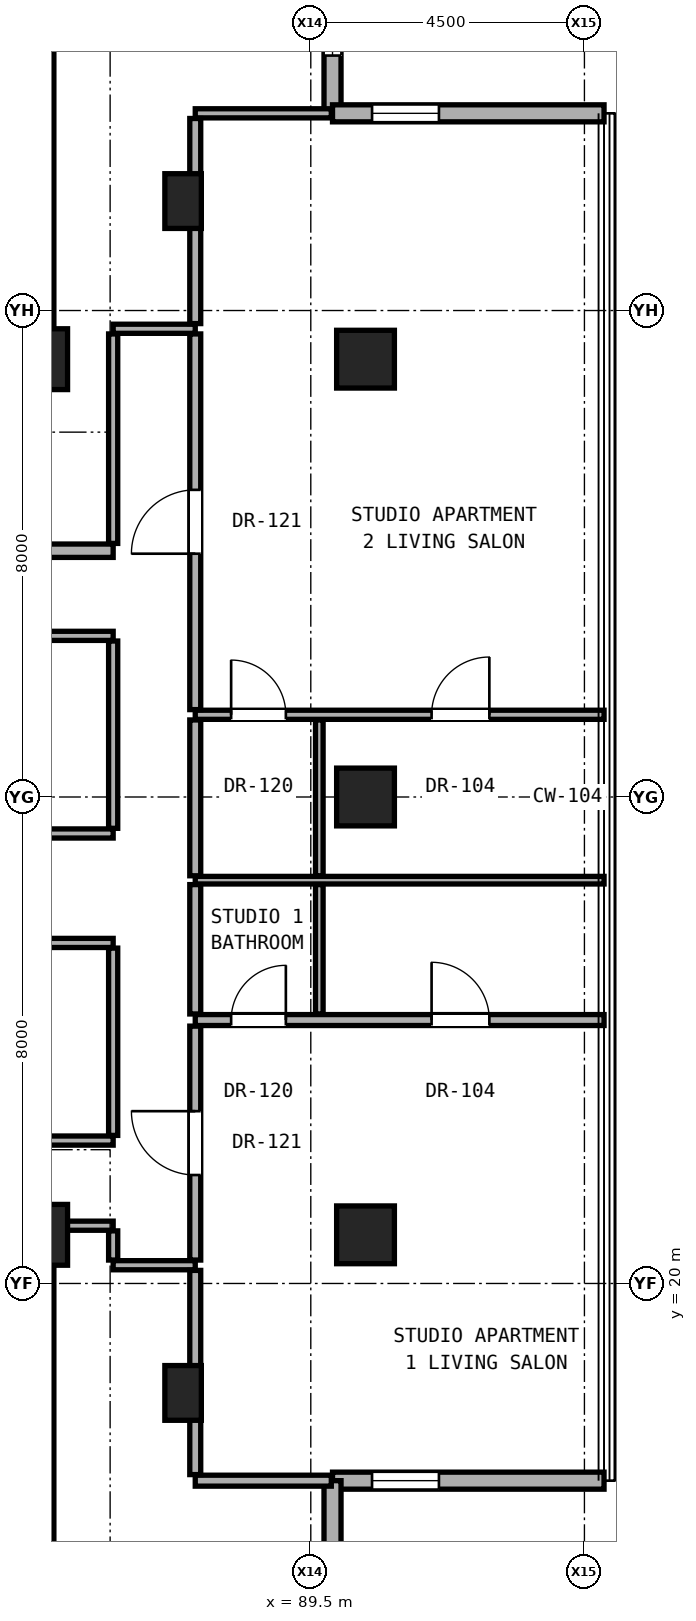
"""IFC4 building model, lengths in metres.
Left out: names, types, materials, properties, quantities, classifications, styles, units other than length and angle.
Written with IfcOpenShell. Run it as: python <this file> out.ifc"""

import sys

from ifc_helpers import new_model, si_unit, direction, frame, frame_2d, origin, origin_2d, place, context, subcontext, project, spatial, rectangle, hollow_rectangle, extrude, element, fill, save


model = new_model("IFC4")
c1 = context("Model", 3, precision=1e-05, world=origin(), true_north=direction((0.0, 1.0)))
c2 = subcontext(c1, "Body", "Model", "MODEL_VIEW")
j1 = project(units=[si_unit("LENGTHUNIT", "METRE"), si_unit("PLANEANGLEUNIT", "RADIAN")], contexts=[c1])
p1 = place(None, origin())
s1 = spatial("IfcSite", under=j1, at=p1, CompositionType="ELEMENT")
p2 = place(p1, origin())
s2 = spatial("IfcBuilding", under=s1, at=p2, CompositionType="ELEMENT")
p3 = place(p2, frame((0.0, 0.0, 170.65)))
s3 = spatial("IfcBuildingStorey", under=s2, at=p3, CompositionType="ELEMENT", Elevation=170.65)
for number, where, z_axis, x_axis in (
    (1, (85.0, 20.8, 0.0), (0.0, 0.0, 1.0), (1.0, 0.0, 0.0)),
    (2, (85.0, 35.2, 0.0), (0.0, 0.0, 1.0), (1.0, 0.0, 0.0)),
):
    element("IfcColumn", number, at=place(p3, frame(where, z_axis=z_axis, x_axis=x_axis)), inside=s3, PredefinedType="COLUMN", context=c2, shape_type="SweptSolid", body=[
        extrude(rectangle(XDim=1.0, YDim=1.0, at=origin_2d()), origin(), (0.0, 0.0, 1.0), 3.25),
    ])
for number, where, z_axis, x_axis in (
    (3, (90.4, 20.8, 0.0), (0.0, 0.0, 1.0), (1.0, 0.0, 0.0)),
    (4, (90.4, 28.0, 0.0), (0.0, 0.0, 1.0), (1.0, 0.0, 0.0)),
    (5, (90.4, 35.2, 0.0), (0.0, 0.0, 1.0), (1.0, 0.0, 0.0)),
):
    element("IfcColumn", number, at=place(p3, frame(where, z_axis=z_axis, x_axis=x_axis)), inside=s3, PredefinedType="COLUMN", context=c2, shape_type="SweptSolid", body=[
        extrude(hollow_rectangle(XDim=0.95, YDim=0.95, WallThickness=0.05, at=origin_2d()), origin(), (0.0, 0.0, 1.0), 3.25),
    ])
for number, where, z_axis, x_axis in (
    (6, (87.4, 18.2, 0.0), (0.0, 0.0, 1.0), (1.0, 0.0, 0.0)),
    (7, (87.4, 37.8, 0.0), (0.0, 0.0, 1.0), (1.0, 0.0, 0.0)),
):
    element("IfcColumn", number, at=place(p3, frame(where, z_axis=z_axis, x_axis=x_axis)), inside=s3, PredefinedType="PILASTER", context=c2, shape_type="SweptSolid", body=[
        extrude(rectangle(XDim=0.6, YDim=0.9, at=origin_2d()), origin(), (0.0, 0.0, 1.0), 3.25),
    ])
for number, where, z_axis, x_axis in (
    (8, (85.0, 35.2, 0.0), (0.0, 0.0, 1.0), (0.0, 1.0, 0.0)),
    (9, (85.0, 15.2, 0.0), (0.0, 0.0, 1.0), (0.0, 1.0, 0.0)),
):
    element("IfcWall", number, at=place(p3, frame(where, z_axis=z_axis, x_axis=x_axis)), inside=s3, PredefinedType="SHEAR", context=c2, shape_type="SweptSolid", body=[
        extrude(rectangle(XDim=5.6, YDim=0.55, at=frame_2d((2.8, 0.0))), origin(), (0.0, 0.0, 1.0), 3.05),
    ])
p4 = place(p3, frame((89.857, 39.243, 0.0), z_axis=(0.0, 0.0, 1.0), x_axis=(0.0, 1.0, 0.0)))
e10 = element("IfcWall", 10, at=p4, inside=s3, PredefinedType="SOLIDWALL", context=c2, shape_type="SweptSolid", body=[
    extrude(rectangle(XDim=4.465, YDim=0.28, at=frame_2d((2.232, 0.0))), origin(), (0.0, 0.0, 1.0), 3.03),
])
p5 = place(p4, frame((0.95, 0.0, 0.85)))
e11 = element("IfcOpeningElement", 11, at=p5, cuts=e10, PredefinedType="OPENING", context=c2, shape_type="SweptSolid", body=[
    extrude(rectangle(XDim=1.1, YDim=2.0, at=frame_2d((0.55, 1.0))), frame((0.0, 0.15, 0.0), z_axis=(0.0, -1.0, 0.0), x_axis=(1.0, 0.0, 0.0)), (0.0, 0.0, 1.0), 0.3),
])
p6 = place(p3, frame((89.857, 16.757, 0.0), z_axis=(0.0, 0.0, 1.0), x_axis=(1.0, 0.0, 0.0)))
e12 = element("IfcWall", 12, at=p6, inside=s3, PredefinedType="SOLIDWALL", context=c2, shape_type="SweptSolid", body=[
    extrude(rectangle(XDim=4.465, YDim=0.28, at=frame_2d((2.232, 0.0))), origin(), (0.0, 0.0, 1.0), 3.03),
])
p7 = place(p6, frame((0.65, 0.0, 0.85)))
e13 = element("IfcOpeningElement", 13, at=p7, cuts=e12, PredefinedType="OPENING", context=c2, shape_type="SweptSolid", body=[
    extrude(rectangle(XDim=1.1, YDim=2.0, at=frame_2d((0.55, 1.0))), frame((0.0, 0.15, 0.0), z_axis=(0.0, -1.0, 0.0), x_axis=(1.0, 0.0, 0.0)), (0.0, 0.0, 1.0), 0.3),
])
p8 = place(p3, frame((89.857, 12.292, 0.0), z_axis=(0.0, 0.0, 1.0), x_axis=(0.0, 1.0, 0.0)))
e14 = element("IfcWall", 14, at=p8, inside=s3, PredefinedType="SOLIDWALL", context=c2, shape_type="SweptSolid", body=[
    extrude(rectangle(XDim=4.465, YDim=0.28, at=frame_2d((2.232, 0.0))), origin(), (0.0, 0.0, 1.0), 3.03),
])
p9 = place(p3, frame((94.323, 39.243, 0.0), z_axis=(0.0, 0.0, 1.0), x_axis=(-1.0, 0.0, 0.0)))
e15 = element("IfcWall", 15, at=p9, inside=s3, PredefinedType="SOLIDWALL", context=c2, shape_type="SweptSolid", body=[
    extrude(rectangle(XDim=4.465, YDim=0.28, at=frame_2d((2.232, 0.0))), origin(), (0.0, 0.0, 1.0), 3.03),
])
p10 = place(p9, frame((2.715, 0.0, 0.85)))
e16 = element("IfcOpeningElement", 16, at=p10, cuts=e15, PredefinedType="OPENING", context=c2, shape_type="SweptSolid", body=[
    extrude(rectangle(XDim=1.1, YDim=2.0, at=frame_2d((0.55, 1.0))), frame((0.0, 0.15, 0.0), z_axis=(0.0, -1.0, 0.0), x_axis=(1.0, 0.0, 0.0)), (0.0, 0.0, 1.0), 0.3),
])
p11 = place(p3, frame((87.6, 16.757, 0.0), z_axis=(0.0, 0.0, 1.0), x_axis=(1.0, 0.0, 0.0)))
e17 = element("IfcWall", 17, at=p11, inside=s3, PredefinedType="PARTITIONING", context=c2, shape_type="SweptSolid", body=[
    extrude(rectangle(XDim=2.237, YDim=0.18, at=frame_2d((1.119, 0.0))), origin(), (0.0, 0.0, 1.0), 3.05),
])
p12 = place(p3, frame((86.25, 20.3, 0.0), z_axis=(0.0, 0.0, 1.0), x_axis=(1.0, 0.0, 0.0)))
e18 = element("IfcWall", 18, at=p12, inside=s3, PredefinedType="PARTITIONING", context=c2, shape_type="SweptSolid", body=[
    extrude(rectangle(XDim=1.35, YDim=0.15, at=frame_2d((0.675, 0.0))), origin(), (0.0, 0.0, 1.0), 3.05),
])
p13 = place(p3, frame((85.27, 20.95, 0.0), z_axis=(0.0, 0.0, 1.0), x_axis=(1.0, 0.0, 0.0)))
e19 = element("IfcWall", 19, at=p13, inside=s3, PredefinedType="PARTITIONING", context=c2, shape_type="SweptSolid", body=[
    extrude(rectangle(XDim=0.98, YDim=0.15, at=frame_2d((0.49, 0.0))), origin(), (0.0, 0.0, 1.0), 2.442),
])
p14 = place(p3, frame((78.64, 22.35, 0.0), z_axis=(0.0, 0.0, 1.0), x_axis=(1.0, 0.0, 0.0)))
e20 = element("IfcWall", 20, at=p14, inside=s3, PredefinedType="PARTITIONING", context=c2, shape_type="SweptSolid", body=[
    extrude(rectangle(XDim=7.61, YDim=0.15, at=frame_2d((3.805, 0.0))), origin(), (0.0, 0.0, 1.0), 2.186),
])
p15 = place(p14, frame((3.33, 0.0, 0.0)))
e21 = element("IfcOpeningElement", 21, at=p15, cuts=e20, PredefinedType="OPENING", context=c2, shape_type="SweptSolid", body=[
    extrude(rectangle(XDim=0.95, YDim=2.15, at=frame_2d((0.475, 1.075))), frame((0.0, 0.085, 0.0), z_axis=(0.0, -1.0, 0.0), x_axis=(1.0, 0.0, 0.0)), (0.0, 0.0, 1.0), 0.17),
])
p16 = place(p3, frame((87.6, 24.332, 0.0), z_axis=(0.0, 0.0, 1.0), x_axis=(1.0, 0.0, 0.0)))
e22 = element("IfcWall", 22, at=p16, inside=s3, PredefinedType="PARTITIONING", context=c2, shape_type="SweptSolid", body=[
    extrude(rectangle(XDim=6.723, YDim=0.18, at=frame_2d((3.361, 0.0))), origin(), (0.0, 0.0, 1.0), 2.269),
])
p17 = place(p16, frame((3.886, 0.0, 0.0)))
e23 = element("IfcOpeningElement", 23, at=p17, cuts=e22, PredefinedType="OPENING", context=c2, shape_type="SweptSolid", body=[
    extrude(rectangle(XDim=0.95, YDim=2.15, at=frame_2d((0.475, 1.075))), frame((0.0, 0.1, 0.0), z_axis=(0.0, -1.0, 0.0), x_axis=(1.0, 0.0, 0.0)), (0.0, 0.0, 1.0), 0.2),
])
p18 = place(p16, frame((0.59, 0.0, 0.0)))
e24 = element("IfcOpeningElement", 24, at=p18, cuts=e22, PredefinedType="OPENING", context=c2, shape_type="SweptSolid", body=[
    extrude(rectangle(XDim=0.9, YDim=2.1, at=frame_2d((0.45, 1.05))), frame((0.0, 0.1, 0.0), z_axis=(0.0, -1.0, 0.0), x_axis=(1.0, 0.0, 0.0)), (0.0, 0.0, 1.0), 0.2),
])
p19 = place(p3, frame((78.6, 25.6, 0.0), z_axis=(0.0, 0.0, 1.0), x_axis=(1.0, 0.0, 0.0)))
e25 = element("IfcWall", 25, at=p19, inside=s3, PredefinedType="PARTITIONING", context=c2, shape_type="SweptSolid", body=[
    extrude(rectangle(XDim=7.65, YDim=0.15, at=frame_2d((3.825, 0.0))), origin(), (0.0, 0.0, 1.0), 2.186),
])
p20 = place(p3, frame((87.6, 26.632, 0.0), z_axis=(0.0, 0.0, 1.0), x_axis=(1.0, 0.0, 0.0)))
e26 = element("IfcWall", 26, at=p20, inside=s3, PredefinedType="PARTITIONING", context=c2, shape_type="SweptSolid", body=[
    extrude(rectangle(XDim=6.723, YDim=0.125, at=frame_2d((3.361, 0.0))), origin(), (0.0, 0.0, 1.0), 2.269),
])
p21 = place(p3, frame((78.6, 27.4, 0.0), z_axis=(0.0, 0.0, 1.0), x_axis=(1.0, 0.0, 0.0)))
e27 = element("IfcWall", 27, at=p21, inside=s3, PredefinedType="PARTITIONING", context=c2, shape_type="SweptSolid", body=[
    extrude(rectangle(XDim=7.65, YDim=0.15, at=frame_2d((3.825, 0.0))), origin(), (0.0, 0.0, 1.0), 2.186),
])
p22 = place(p3, frame((87.6, 29.352, 0.0), z_axis=(0.0, 0.0, 1.0), x_axis=(1.0, 0.0, 0.0)))
e28 = element("IfcWall", 28, at=p22, inside=s3, PredefinedType="PARTITIONING", context=c2, shape_type="SweptSolid", body=[
    extrude(rectangle(XDim=6.723, YDim=0.15, at=frame_2d((3.361, 0.0))), origin(), (0.0, 0.0, 1.0), 2.269),
])
p23 = place(p22, frame((3.886, 0.0, 0.0)))
e29 = element("IfcOpeningElement", 29, at=p23, cuts=e28, PredefinedType="OPENING", context=c2, shape_type="SweptSolid", body=[
    extrude(rectangle(XDim=0.95, YDim=2.15, at=frame_2d((0.475, 1.075))), frame((0.0, 0.085, 0.0), z_axis=(0.0, -1.0, 0.0), x_axis=(1.0, 0.0, 0.0)), (0.0, 0.0, 1.0), 0.17),
])
p24 = place(p22, frame((0.59, 0.0, 0.0)))
e30 = element("IfcOpeningElement", 30, at=p24, cuts=e28, PredefinedType="OPENING", context=c2, shape_type="SweptSolid", body=[
    extrude(rectangle(XDim=0.9, YDim=2.1, at=frame_2d((0.45, 1.05))), frame((0.0, 0.085, 0.0), z_axis=(0.0, -1.0, 0.0), x_axis=(1.0, 0.0, 0.0)), (0.0, 0.0, 1.0), 0.17),
])
p25 = place(p3, frame((78.64, 30.65, 0.0), z_axis=(0.0, 0.0, 1.0), x_axis=(1.0, 0.0, 0.0)))
e31 = element("IfcWall", 31, at=p25, inside=s3, PredefinedType="PARTITIONING", context=c2, shape_type="SweptSolid", body=[
    extrude(rectangle(XDim=7.61, YDim=0.15, at=frame_2d((3.805, 0.0))), origin(), (0.0, 0.0, 1.0), 2.186),
])
p26 = place(p25, frame((3.33, 0.0, 0.0)))
e32 = element("IfcOpeningElement", 32, at=p26, cuts=e31, PredefinedType="OPENING", context=c2, shape_type="SweptSolid", body=[
    extrude(rectangle(XDim=0.95, YDim=2.15, at=frame_2d((0.475, 1.075))), frame((0.0, 0.085, 0.0), z_axis=(0.0, -1.0, 0.0), x_axis=(1.0, 0.0, 0.0)), (0.0, 0.0, 1.0), 0.17),
])
p27 = place(p3, frame((71.55, 32.05, 0.0), z_axis=(0.0, 0.0, 1.0), x_axis=(1.0, 0.0, 0.0)))
e33 = element("IfcWall", 33, at=p27, inside=s3, PredefinedType="SOLIDWALL", context=c2, shape_type="SweptSolid", body=[
    extrude(rectangle(XDim=14.7, YDim=0.22, at=frame_2d((7.35, 0.0))), origin(), (0.0, 0.0, 1.0), 2.186),
])
p28 = place(p27, frame((6.065, 0.0, 0.0)))
e34 = element("IfcOpeningElement", 34, at=p28, cuts=e33, PredefinedType="OPENING", context=c2, shape_type="SweptSolid", body=[
    extrude(rectangle(XDim=0.85, YDim=2.01, at=frame_2d((0.425, 1.005))), frame((0.0, 0.12, 0.0), z_axis=(0.0, -1.0, 0.0), x_axis=(1.0, 0.0, 0.0)), (0.0, 0.0, 1.0), 0.24),
])
p29 = place(p27, frame((10.535, 0.0, 0.0)))
e35 = element("IfcOpeningElement", 35, at=p29, cuts=e33, PredefinedType="OPENING", context=c2, shape_type="SweptSolid", body=[
    extrude(rectangle(XDim=0.95, YDim=2.15, at=frame_2d((0.475, 1.075))), frame((0.0, 0.12, 0.0), z_axis=(0.0, -1.0, 0.0), x_axis=(1.0, 0.0, 0.0)), (0.0, 0.0, 1.0), 0.24),
])
p30 = place(p27, frame((0.7, 0.0, 0.0)))
e36 = element("IfcOpeningElement", 36, at=p30, cuts=e33, PredefinedType="OPENING", context=c2, shape_type="SweptSolid", body=[
    extrude(rectangle(XDim=0.85, YDim=2.01, at=frame_2d((0.425, 1.005))), frame((0.0, 0.12, 0.0), z_axis=(0.0, -1.0, 0.0), x_axis=(1.0, 0.0, 0.0)), (0.0, 0.0, 1.0), 0.24),
])
p31 = place(p27, frame((2.55, 0.0, 0.0)))
e37 = element("IfcOpeningElement", 37, at=p31, cuts=e33, PredefinedType="OPENING", context=c2, shape_type="SweptSolid", body=[
    extrude(rectangle(XDim=0.85, YDim=2.01, at=frame_2d((0.425, 1.005))), frame((0.0, 0.12, 0.0), z_axis=(0.0, -1.0, 0.0), x_axis=(1.0, 0.0, 0.0)), (0.0, 0.0, 1.0), 0.24),
])
p32 = place(p3, frame((86.25, 35.7, 0.0), z_axis=(0.0, 0.0, 1.0), x_axis=(1.0, 0.0, 0.0)))
e38 = element("IfcWall", 38, at=p32, inside=s3, PredefinedType="PARTITIONING", context=c2, shape_type="SweptSolid", body=[
    extrude(rectangle(XDim=1.35, YDim=0.15, at=frame_2d((0.675, 0.0))), origin(), (0.0, 0.0, 1.0), 3.05),
])
p33 = place(p3, frame((87.6, 39.243, 0.0), z_axis=(0.0, 0.0, 1.0), x_axis=(1.0, 0.0, 0.0)))
e39 = element("IfcWall", 39, at=p33, inside=s3, PredefinedType="PARTITIONING", context=c2, shape_type="SweptSolid", body=[
    extrude(rectangle(XDim=2.237, YDim=0.15, at=frame_2d((1.119, 0.0))), origin(), (0.0, 0.0, 1.0), 3.05),
])
p34 = place(p3, frame((86.25, 20.385, 0.0), z_axis=(0.0, 0.0, 1.0), x_axis=(0.0, 1.0, 0.0)))
e40 = element("IfcWall", 40, at=p34, inside=s3, PredefinedType="PARTITIONING", context=c2, shape_type="SweptSolid", body=[
    extrude(rectangle(XDim=0.48, YDim=0.15, at=frame_2d((0.24, 0.0))), origin(), (0.0, 0.0, 1.0), 2.442),
])
p35 = place(p3, frame((86.25, 22.435, 0.0), z_axis=(0.0, 0.0, 1.0), x_axis=(0.0, 1.0, 0.0)))
e41 = element("IfcWall", 41, at=p35, inside=s3, PredefinedType="PARTITIONING", context=c2, shape_type="SweptSolid", body=[
    extrude(rectangle(XDim=3.08, YDim=0.15, at=frame_2d((1.54, 0.0))), origin(), (0.0, 0.0, 1.0), 3.05),
])
p36 = place(p3, frame((86.25, 27.485, 0.0), z_axis=(0.0, 0.0, 1.0), x_axis=(0.0, 1.0, 0.0)))
e42 = element("IfcWall", 42, at=p36, inside=s3, PredefinedType="PARTITIONING", context=c2, shape_type="SweptSolid", body=[
    extrude(rectangle(XDim=3.08, YDim=0.15, at=frame_2d((1.54, 0.0))), origin(), (0.0, 0.0, 1.0), 2.346),
])
p37 = place(p3, frame((86.25, 32.17, 0.0), z_axis=(0.0, 0.0, 1.0), x_axis=(0.0, 1.0, 0.0)))
e43 = element("IfcWall", 43, at=p37, inside=s3, PredefinedType="PARTITIONING", context=c2, shape_type="SweptSolid", body=[
    extrude(rectangle(XDim=3.445, YDim=0.15, at=frame_2d((1.723, 0.0))), origin(), (0.0, 0.0, 1.0), 2.442),
])
p38 = place(p3, frame((87.6, 16.857, 0.0), z_axis=(0.0, 0.0, 1.0), x_axis=(0.0, 1.0, 0.0)))
e44 = element("IfcWall", 44, at=p38, inside=s3, PredefinedType="PARTITIONING", context=c2, shape_type="SweptSolid", body=[
    extrude(rectangle(XDim=3.358, YDim=0.18, at=frame_2d((1.679, 0.0))), origin(), (0.0, 0.0, 1.0), 2.493),
])
p39 = place(p3, frame((87.6, 20.385, 0.0), z_axis=(0.0, 0.0, 1.0), x_axis=(0.0, 1.0, 0.0)))
e45 = element("IfcWall", 45, at=p39, inside=s3, PredefinedType="PARTITIONING", context=c2, shape_type="SweptSolid", body=[
    extrude(rectangle(XDim=3.847, YDim=0.18, at=frame_2d((1.923, 0.0))), origin(), (0.0, 0.0, 1.0), 2.442),
])
p40 = place(p39, frame((1.398, 0.0, 0.0)))
e46 = element("IfcOpeningElement", 46, at=p40, cuts=e45, PredefinedType="OPENING", context=c2, shape_type="SweptSolid", body=[
    extrude(rectangle(XDim=1.05, YDim=2.2, at=frame_2d((0.525, 1.1))), frame((0.0, 0.1, 0.0), z_axis=(0.0, -1.0, 0.0), x_axis=(1.0, 0.0, 0.0)), (0.0, 0.0, 1.0), 0.2),
])
p41 = place(p3, frame((87.6, 24.432, 0.0), z_axis=(0.0, 0.0, 1.0), x_axis=(0.0, 1.0, 0.0)))
e47 = element("IfcWall", 47, at=p41, inside=s3, PredefinedType="PARTITIONING", context=c2, shape_type="SweptSolid", body=[
    extrude(rectangle(XDim=2.128, YDim=0.18, at=frame_2d((1.064, 0.0))), origin(), (0.0, 0.0, 1.0), 3.05),
])
p42 = place(p3, frame((87.6, 26.705, 0.0), z_axis=(0.0, 0.0, 1.0), x_axis=(0.0, 1.0, 0.0)))
e48 = element("IfcWall", 48, at=p42, inside=s3, PredefinedType="PARTITIONING", context=c2, shape_type="SweptSolid", body=[
    extrude(rectangle(XDim=2.562, YDim=0.18, at=frame_2d((1.281, 0.0))), origin(), (0.0, 0.0, 1.0), 2.346),
])
p43 = place(p3, frame((87.6, 29.437, 0.0), z_axis=(0.0, 0.0, 1.0), x_axis=(0.0, 1.0, 0.0)))
e49 = element("IfcWall", 49, at=p43, inside=s3, PredefinedType="PARTITIONING", context=c2, shape_type="SweptSolid", body=[
    extrude(rectangle(XDim=6.178, YDim=0.18, at=frame_2d((3.089, 0.0))), origin(), (0.0, 0.0, 1.0), 2.442),
])
p44 = place(p43, frame((2.564, 0.0, 0.0)))
e50 = element("IfcOpeningElement", 50, at=p44, cuts=e49, PredefinedType="OPENING", context=c2, shape_type="SweptSolid", body=[
    extrude(rectangle(XDim=1.05, YDim=2.2, at=frame_2d((0.525, 1.1))), frame((0.0, 0.1, 0.0), z_axis=(0.0, -1.0, 0.0), x_axis=(1.0, 0.0, 0.0)), (0.0, 0.0, 1.0), 0.2),
])
p45 = place(p3, frame((87.6, 35.785, 0.0), z_axis=(0.0, 0.0, 1.0), x_axis=(0.0, 1.0, 0.0)))
e51 = element("IfcWall", 51, at=p45, inside=s3, PredefinedType="PARTITIONING", context=c2, shape_type="SweptSolid", body=[
    extrude(rectangle(XDim=3.373, YDim=0.18, at=frame_2d((1.687, 0.0))), origin(), (0.0, 0.0, 1.0), 2.493),
])
p46 = place(p3, frame((89.64, 24.432, 0.0), z_axis=(0.0, 0.0, 1.0), x_axis=(0.0, 1.0, 0.0)))
e52 = element("IfcWall", 52, at=p46, inside=s3, PredefinedType="PARTITIONING", context=c2, shape_type="SweptSolid", body=[
    extrude(rectangle(XDim=2.128, YDim=0.125, at=frame_2d((1.064, 0.0))), origin(), (0.0, 0.0, 1.0), 3.05),
])
p47 = place(p3, frame((89.64, 26.705, 0.0), z_axis=(0.0, 0.0, 1.0), x_axis=(0.0, 1.0, 0.0)))
e53 = element("IfcWall", 53, at=p47, inside=s3, PredefinedType="PARTITIONING", context=c2, shape_type="SweptSolid", body=[
    extrude(rectangle(XDim=2.562, YDim=0.125, at=frame_2d((1.281, 0.0))), origin(), (0.0, 0.0, 1.0), 2.346),
])
p48 = place(p5, origin())
e54 = element("IfcWindow", 54, at=p48, inside=s3, PartitioningType="SINGLE_PANEL", PredefinedType="WINDOW", context=c2, shape_type="SweptSolid", body=[
    extrude(rectangle(XDim=1.1, YDim=2.0, at=frame_2d((0.55, 1.0))), frame((0.0, 0.03, 0.0), z_axis=(0.0, -1.0, 0.0), x_axis=(1.0, 0.0, 0.0)), (0.0, 0.0, 1.0), 0.06),
])
fill(e11, e54)
p49 = place(p7, origin())
e55 = element("IfcWindow", 55, at=p49, inside=s3, PartitioningType="SINGLE_PANEL", PredefinedType="WINDOW", context=c2, shape_type="SweptSolid", body=[
    extrude(rectangle(XDim=1.1, YDim=2.0, at=frame_2d((0.55, 1.0))), frame((0.0, 0.03, 0.0), z_axis=(0.0, -1.0, 0.0), x_axis=(1.0, 0.0, 0.0)), (0.0, 0.0, 1.0), 0.06),
])
fill(e13, e55)
p50 = place(p10, origin())
e56 = element("IfcWindow", 56, at=p50, inside=s3, PartitioningType="SINGLE_PANEL", PredefinedType="WINDOW", context=c2, shape_type="SweptSolid", body=[
    extrude(rectangle(XDim=1.1, YDim=2.0, at=frame_2d((0.55, 1.0))), frame((0.0, 0.03, 0.0), z_axis=(0.0, -1.0, 0.0), x_axis=(1.0, 0.0, 0.0)), (0.0, 0.0, 1.0), 0.06),
])
fill(e16, e56)
p51 = place(p40, origin())
e57 = element("IfcDoor", 57, at=p51, inside=s3, OperationType="SINGLE_SWING_RIGHT", PredefinedType="DOOR", context=c2, shape_type="SweptSolid", body=[
    extrude(rectangle(XDim=1.05, YDim=2.2, at=frame_2d((0.525, 1.1))), frame((0.0, 0.025, 0.0), z_axis=(0.0, -1.0, 0.0), x_axis=(1.0, 0.0, 0.0)), (0.0, 0.0, 1.0), 0.05),
])
fill(e46, e57)
p52 = place(p17, origin())
e58 = element("IfcDoor", 58, at=p52, inside=s3, OperationType="SINGLE_SWING_LEFT", PredefinedType="DOOR", context=c2, shape_type="SweptSolid", body=[
    extrude(rectangle(XDim=0.95, YDim=2.15, at=frame_2d((0.475, 1.075))), frame((0.0, 0.025, 0.0), z_axis=(0.0, -1.0, 0.0), x_axis=(1.0, 0.0, 0.0)), (0.0, 0.0, 1.0), 0.05),
])
fill(e23, e58)
p53 = place(p18, origin())
e59 = element("IfcDoor", 59, at=p53, inside=s3, OperationType="SINGLE_SWING_RIGHT", PredefinedType="DOOR", context=c2, shape_type="SweptSolid", body=[
    extrude(rectangle(XDim=0.9, YDim=2.1, at=frame_2d((0.45, 1.05))), frame((0.0, 0.025, 0.0), z_axis=(0.0, -1.0, 0.0), x_axis=(1.0, 0.0, 0.0)), (0.0, 0.0, 1.0), 0.05),
])
fill(e24, e59)
p54 = place(p44, origin())
e60 = element("IfcDoor", 60, at=p54, inside=s3, OperationType="SINGLE_SWING_LEFT", PredefinedType="DOOR", context=c2, shape_type="SweptSolid", body=[
    extrude(rectangle(XDim=1.05, YDim=2.2, at=frame_2d((0.525, 1.1))), frame((0.0, 0.025, 0.0), z_axis=(0.0, -1.0, 0.0), x_axis=(1.0, 0.0, 0.0)), (0.0, 0.0, 1.0), 0.05),
])
fill(e50, e60)
p55 = place(p23, origin())
e61 = element("IfcDoor", 61, at=p55, inside=s3, OperationType="SINGLE_SWING_RIGHT", PredefinedType="DOOR", context=c2, shape_type="SweptSolid", body=[
    extrude(rectangle(XDim=0.95, YDim=2.15, at=frame_2d((0.475, 1.075))), frame((0.0, 0.025, 0.0), z_axis=(0.0, -1.0, 0.0), x_axis=(1.0, 0.0, 0.0)), (0.0, 0.0, 1.0), 0.05),
])
fill(e29, e61)
p56 = place(p24, origin())
e62 = element("IfcDoor", 62, at=p56, inside=s3, OperationType="SINGLE_SWING_LEFT", PredefinedType="DOOR", context=c2, shape_type="SweptSolid", body=[
    extrude(rectangle(XDim=0.9, YDim=2.1, at=frame_2d((0.45, 1.05))), frame((0.0, 0.025, 0.0), z_axis=(0.0, -1.0, 0.0), x_axis=(1.0, 0.0, 0.0)), (0.0, 0.0, 1.0), 0.05),
])
fill(e30, e62)
save(model, sys.argv[1])
